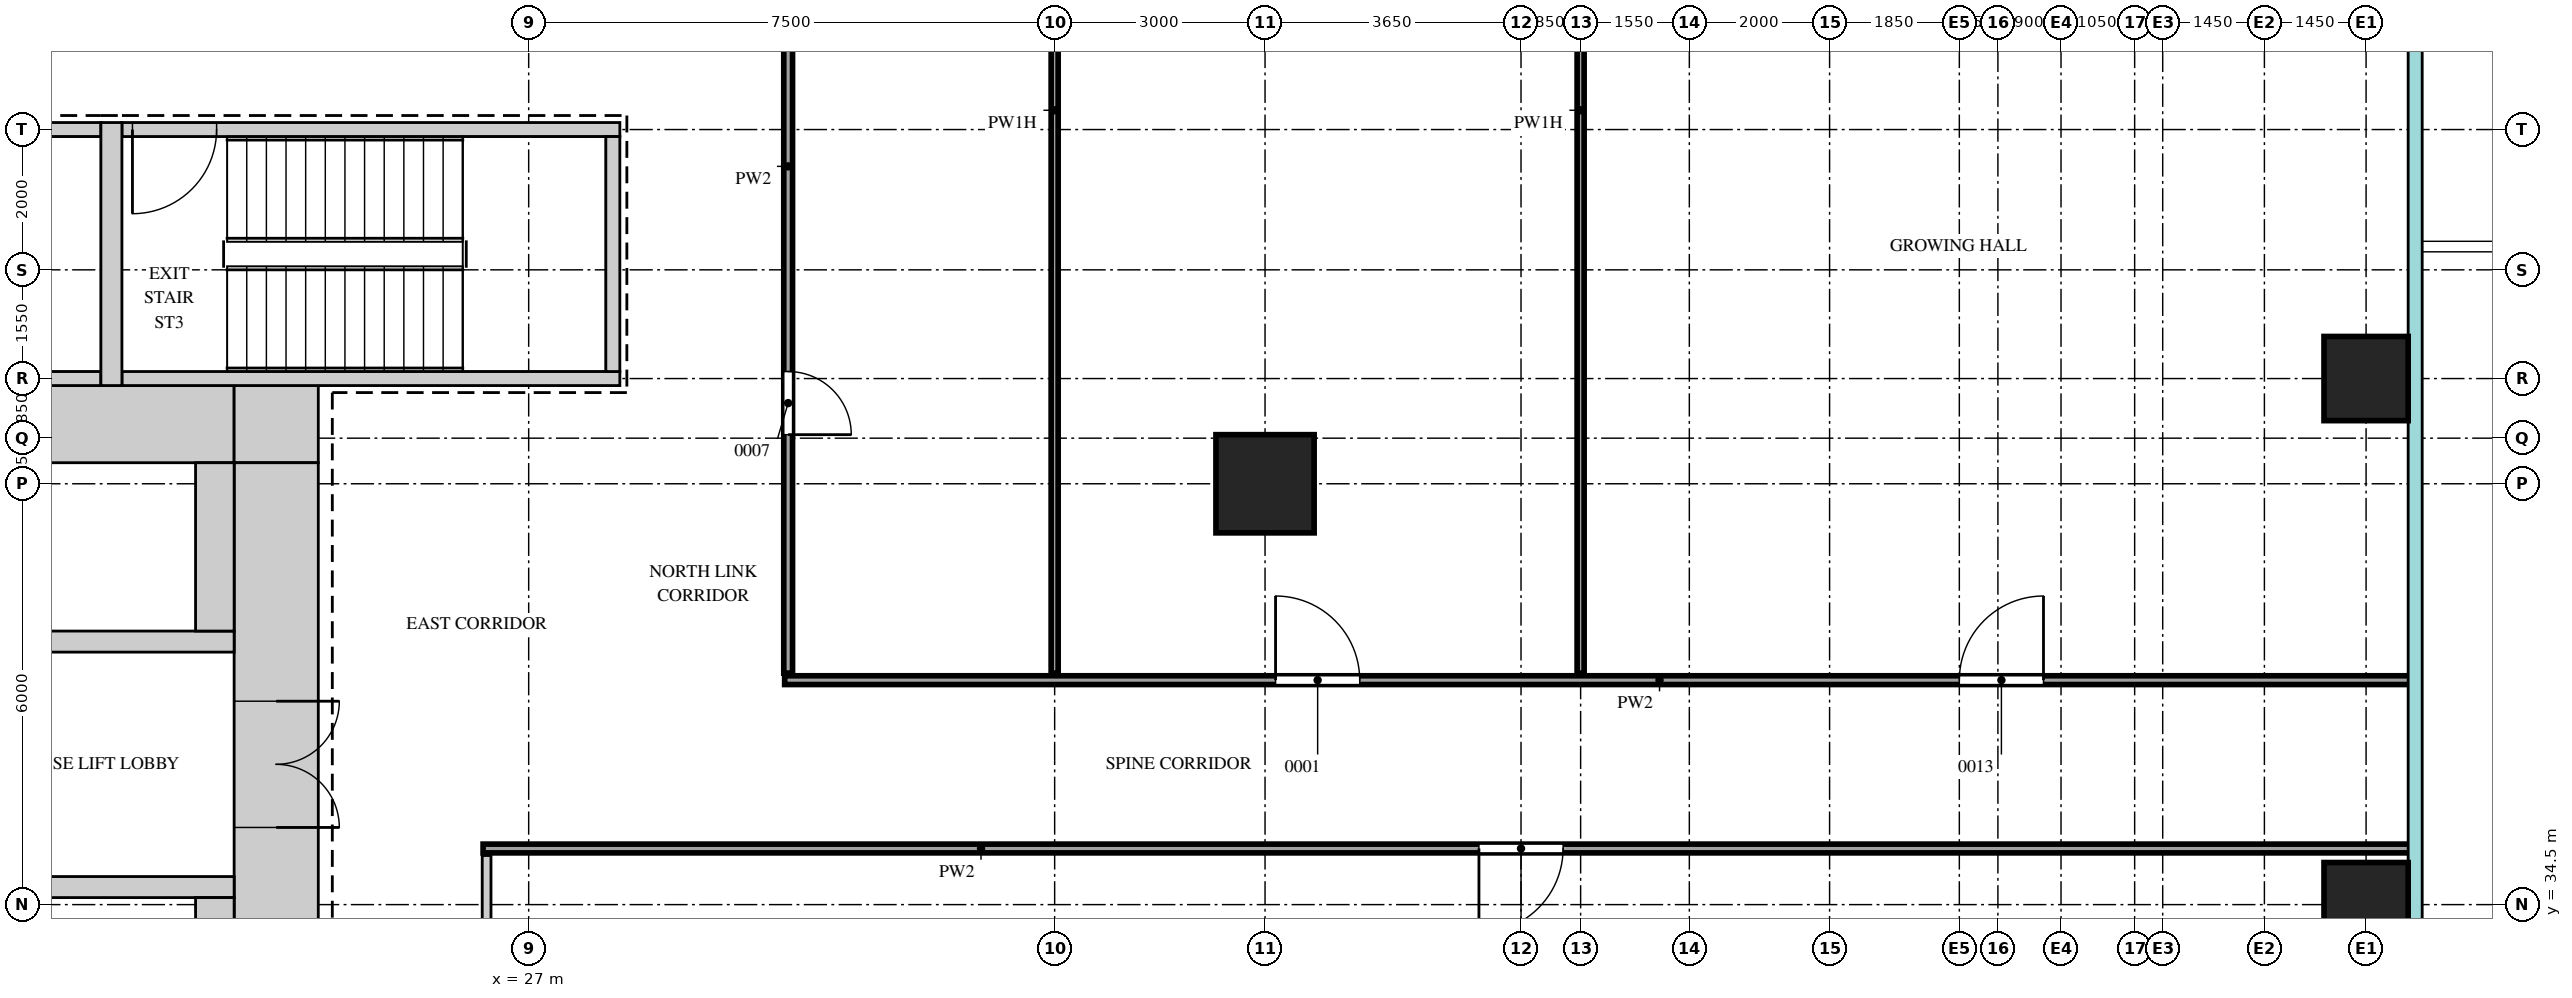
"""IFC4 building model, lengths in metres.
Left out: names, types, materials, properties, quantities, classifications, styles, units other than length and angle.
Written with IfcOpenShell. Run it as: python <this file> out.ifc"""

import sys

from ifc_helpers import new_model, si_unit, direction, frame, frame_2d, origin, origin_2d, place, context, subcontext, project, spatial, rectangle, extrude, source, transform, mapped, element, fill, save


model = new_model("IFC4")
c1 = context("Model", 3, precision=1e-05, world=origin(), true_north=direction((0.0, 1.0)))
c2 = subcontext(c1, "Body", "Model", "MODEL_VIEW")
j1 = project(units=[si_unit("LENGTHUNIT", "METRE"), si_unit("PLANEANGLEUNIT", "RADIAN")], contexts=[c1])
p1 = place(None, origin())
s1 = spatial("IfcSite", under=j1, at=p1, CompositionType="ELEMENT")
p2 = place(p1, origin())
s2 = spatial("IfcBuilding", under=s1, at=p2, CompositionType="ELEMENT")
p3 = place(p2, frame((0.0, 0.0, 51.0)))
s3 = spatial("IfcBuildingStorey", under=s2, at=p3, CompositionType="ELEMENT", Elevation=51.0)
m1 = source(origin(), c2, "Body", "SweptSolid", [
    extrude(rectangle(XDim=8.9, YDim=1.1, at=frame_2d((4.45, 0.0))), origin(), (0.0, 0.0, 1.0), 4.2),
])
p4 = place(p3, frame((13.9, 41.35, 0.0), z_axis=(0.0, 0.0, 1.0), x_axis=(1.0, 0.0, 0.0)))
e1 = element("IfcWall", 1, at=p4, inside=s3, PredefinedType="SHEAR", context=c2, shape_type="MappedRepresentation", body=[
    mapped(m1, transform((0.0, 0.0, 0.0))),
])
m2 = source(origin(), c2, "Body", "SweptSolid", [
    extrude(rectangle(XDim=1.2, YDim=1.1, at=frame_2d((0.6, 0.0))), origin(), (0.0, 0.0, 1.0), 4.2),
])
p5 = place(p3, frame((22.8, 41.35, 0.0), z_axis=(0.0, 0.0, 1.0), x_axis=(1.0, 0.0, 0.0)))
e2 = element("IfcWall", 2, at=p5, inside=s3, PredefinedType="SHEAR", context=c2, shape_type="MappedRepresentation", body=[
    mapped(m2, transform((0.0, 0.0, 0.0))),
])
m3 = source(origin(), c2, "Body", "SweptSolid", [
    extrude(rectangle(XDim=27.6, YDim=1.2, at=frame_2d((13.8, 0.0))), origin(), (0.0, 0.0, 1.0), 4.2),
])
p6 = place(p3, frame((23.4, 13.2, 0.0), z_axis=(0.0, 0.0, 1.0), x_axis=(0.0, 1.0, 0.0)))
e3 = element("IfcWall", 3, at=p6, inside=s3, PredefinedType="SHEAR", context=c2, shape_type="MappedRepresentation", body=[
    mapped(m3, transform((0.0, 0.0, 0.0))),
])
m4 = source(origin(), c2, "Body", "SweptSolid", [
    extrude(rectangle(XDim=1.8, YDim=2.1, at=frame_2d((0.9, 1.05))), frame((0.0, 0.61, 0.0), z_axis=(0.0, -1.0, 0.0), x_axis=(1.0, 0.0, 0.0)), (0.0, 0.0, 1.0), 1.22),
])
p7 = place(p6, frame((22.4, 0.0, 0.0)))
e4 = element("IfcOpeningElement", 4, at=p7, cuts=e3, PredefinedType="OPENING", context=c2, shape_type="MappedRepresentation", body=[
    mapped(m4, transform((0.0, 0.0, 0.0))),
])
m5 = source(origin(), c2, "Body", "SweptSolid", [
    extrude(rectangle(XDim=1.2, YDim=2.1, at=frame_2d((0.6, 1.05))), frame((0.0, 0.61, 0.0), z_axis=(0.0, -1.0, 0.0), x_axis=(1.0, 0.0, 0.0)), (0.0, 0.0, 1.0), 1.22),
])
p8 = place(p6, frame((15.15, 0.0, 0.0)))
e5 = element("IfcOpeningElement", 5, at=p8, cuts=e3, PredefinedType="OPENING", context=c2, shape_type="MappedRepresentation", body=[
    mapped(m5, transform((0.0, 0.0, 0.0))),
])
m6 = source(origin(), c2, "Body", "SweptSolid", [
    extrude(rectangle(XDim=0.9, YDim=2.1, at=frame_2d((0.45, 1.05))), frame((0.0, 0.61, 0.0), z_axis=(0.0, -1.0, 0.0), x_axis=(1.0, 0.0, 0.0)), (0.0, 0.0, 1.0), 1.22),
])
p9 = place(p6, frame((1.15, 0.0, 0.0)))
e6 = element("IfcOpeningElement", 6, at=p9, cuts=e3, PredefinedType="OPENING", context=c2, shape_type="MappedRepresentation", body=[
    mapped(m6, transform((0.0, 0.0, 0.0))),
])
p10 = place(p6, frame((4.35, 0.0, 0.0)))
e7 = element("IfcOpeningElement", 7, at=p10, cuts=e3, PredefinedType="OPENING", context=c2, shape_type="MappedRepresentation", body=[
    mapped(m6, transform((0.0, 0.0, 0.0))),
])
p11 = place(p6, frame((7.6, 0.0, 0.0)))
e8 = element("IfcOpeningElement", 8, at=p11, cuts=e3, PredefinedType="OPENING", context=c2, shape_type="MappedRepresentation", body=[
    mapped(m6, transform((0.0, 0.0, 0.0))),
])
m7 = source(origin(), c2, "Body", "SweptSolid", [
    extrude(rectangle(XDim=7.0, YDim=0.2, at=frame_2d((3.5, 0.0))), origin(), (0.0, 0.0, 1.0), 4.2),
])
p12 = place(p3, frame((13.9, 45.55, 0.0), z_axis=(0.0, 0.0, 1.0), x_axis=(1.0, 0.0, 0.0)))
e9 = element("IfcWall", 9, at=p12, inside=s3, PredefinedType="SHEAR", context=c2, shape_type="MappedRepresentation", body=[
    mapped(m7, transform((0.0, 0.0, 0.0))),
])
m8 = source(origin(), c2, "Body", "SweptSolid", [
    extrude(rectangle(XDim=1.2, YDim=2.1, at=frame_2d((0.6, 1.05))), frame((0.0, 0.11, 0.0), z_axis=(0.0, -1.0, 0.0), x_axis=(1.0, 0.0, 0.0)), (0.0, 0.0, 1.0), 0.22),
])
p13 = place(p12, frame((0.35, 0.0, 0.0)))
e10 = element("IfcOpeningElement", 10, at=p13, cuts=e9, PredefinedType="OPENING", context=c2, shape_type="MappedRepresentation", body=[
    mapped(m8, transform((0.0, 0.0, 0.0))),
])
p14 = place(p3, frame((13.9, 42.0, 0.0), z_axis=(0.0, 0.0, 1.0), x_axis=(1.0, 0.0, 0.0)))
e11 = element("IfcWall", 11, at=p14, inside=s3, PredefinedType="SHEAR", context=c2, shape_type="MappedRepresentation", body=[
    mapped(m7, transform((0.0, 0.0, 0.0))),
])
m9 = source(origin(), c2, "Body", "SweptSolid", [
    extrude(rectangle(XDim=7.1, YDim=0.2, at=frame_2d((3.55, 0.0))), origin(), (0.0, 0.0, 1.0), 4.2),
])
p15 = place(p3, frame((21.2, 45.55, 0.0), z_axis=(0.0, 0.0, 1.0), x_axis=(1.0, 0.0, 0.0)))
e12 = element("IfcWall", 12, at=p15, inside=s3, PredefinedType="SHEAR", context=c2, shape_type="MappedRepresentation", body=[
    mapped(m9, transform((0.0, 0.0, 0.0))),
])
p16 = place(p15, frame((0.15, 0.0, 0.0)))
e13 = element("IfcOpeningElement", 13, at=p16, cuts=e12, PredefinedType="OPENING", context=c2, shape_type="MappedRepresentation", body=[
    mapped(m8, transform((0.0, 0.0, 0.0))),
])
p17 = place(p3, frame((21.2, 42.0, 0.0), z_axis=(0.0, 0.0, 1.0), x_axis=(1.0, 0.0, 0.0)))
e14 = element("IfcWall", 14, at=p17, inside=s3, PredefinedType="SHEAR", context=c2, shape_type="MappedRepresentation", body=[
    mapped(m9, transform((0.0, 0.0, 0.0))),
])
m10 = source(origin(), c2, "Body", "SweptSolid", [
    extrude(rectangle(XDim=3.75, YDim=0.3, at=frame_2d((1.875, 0.0))), origin(), (0.0, 0.0, 1.0), 4.2),
])
p18 = place(p3, frame((21.05, 41.9, 0.0), z_axis=(0.0, 0.0, 1.0), x_axis=(0.0, 1.0, 0.0)))
e15 = element("IfcWall", 15, at=p18, inside=s3, PredefinedType="SHEAR", context=c2, shape_type="MappedRepresentation", body=[
    mapped(m10, transform((0.0, 0.0, 0.0))),
])
m11 = source(origin(), c2, "Body", "SweptSolid", [
    extrude(rectangle(XDim=3.35, YDim=0.2, at=frame_2d((1.675, 0.0))), origin(), (0.0, 0.0, 1.0), 4.2),
])
p19 = place(p3, frame((28.2, 42.1, 0.0), z_axis=(0.0, 0.0, 1.0), x_axis=(0.0, 1.0, 0.0)))
e16 = element("IfcWall", 16, at=p19, inside=s3, PredefinedType="SHEAR", context=c2, shape_type="MappedRepresentation", body=[
    mapped(m11, transform((0.0, 0.0, 0.0))),
])
m12 = source(origin(), c2, "Body", "SweptSolid", [
    extrude(rectangle(XDim=15.6, YDim=0.3, at=frame_2d((7.8, 0.0))), origin(), (0.0, 0.0, 1.0), 4.2),
])
p20 = place(p3, frame((7.2, 38.25, 0.0), z_axis=(0.0, 0.0, 1.0), x_axis=(1.0, 0.0, 0.0)))
e17 = element("IfcWall", 17, at=p20, inside=s3, PredefinedType="STANDARD", context=c2, shape_type="MappedRepresentation", body=[
    mapped(m12, transform((0.0, 0.0, 0.0))),
])
m13 = source(origin(), c2, "Body", "SweptSolid", [
    extrude(rectangle(XDim=1.2, YDim=2.1, at=frame_2d((0.6, 1.05))), frame((0.0, 0.16, 0.0), z_axis=(0.0, -1.0, 0.0), x_axis=(1.0, 0.0, 0.0)), (0.0, 0.0, 1.0), 0.32),
])
p21 = place(p20, frame((0.55, 0.0, 0.0)))
e18 = element("IfcOpeningElement", 18, at=p21, cuts=e17, PredefinedType="OPENING", context=c2, shape_type="MappedRepresentation", body=[
    mapped(m13, transform((0.0, 0.0, 0.0))),
])
p22 = place(p20, frame((3.1, 0.0, 0.0)))
e19 = element("IfcOpeningElement", 19, at=p22, cuts=e17, PredefinedType="OPENING", context=c2, shape_type="MappedRepresentation", body=[
    mapped(m13, transform((0.0, 0.0, 0.0))),
])
p23 = place(p20, frame((5.65, 0.0, 0.0)))
e20 = element("IfcOpeningElement", 20, at=p23, cuts=e17, PredefinedType="OPENING", context=c2, shape_type="MappedRepresentation", body=[
    mapped(m13, transform((0.0, 0.0, 0.0))),
])
p24 = place(p20, frame((8.2, 0.0, 0.0)))
e21 = element("IfcOpeningElement", 21, at=p24, cuts=e17, PredefinedType="OPENING", context=c2, shape_type="MappedRepresentation", body=[
    mapped(m13, transform((0.0, 0.0, 0.0))),
])
p25 = place(p3, frame((7.2, 34.75, 0.0), z_axis=(0.0, 0.0, 1.0), x_axis=(1.0, 0.0, 0.0)))
e22 = element("IfcWall", 22, at=p25, inside=s3, PredefinedType="STANDARD", context=c2, shape_type="MappedRepresentation", body=[
    mapped(m12, transform((0.0, 0.0, 0.0))),
])
p26 = place(p25, frame((0.55, 0.0, 0.0)))
e23 = element("IfcOpeningElement", 23, at=p26, cuts=e22, PredefinedType="OPENING", context=c2, shape_type="MappedRepresentation", body=[
    mapped(m13, transform((0.0, 0.0, 0.0))),
])
p27 = place(p25, frame((3.1, 0.0, 0.0)))
e24 = element("IfcOpeningElement", 24, at=p27, cuts=e22, PredefinedType="OPENING", context=c2, shape_type="MappedRepresentation", body=[
    mapped(m13, transform((0.0, 0.0, 0.0))),
])
p28 = place(p25, frame((5.65, 0.0, 0.0)))
e25 = element("IfcOpeningElement", 25, at=p28, cuts=e22, PredefinedType="OPENING", context=c2, shape_type="MappedRepresentation", body=[
    mapped(m13, transform((0.0, 0.0, 0.0))),
])
p29 = place(p25, frame((8.2, 0.0, 0.0)))
e26 = element("IfcOpeningElement", 26, at=p29, cuts=e22, PredefinedType="OPENING", context=c2, shape_type="MappedRepresentation", body=[
    mapped(m13, transform((0.0, 0.0, 0.0))),
])
m14 = source(origin(), c2, "Body", "SweptSolid", [
    extrude(rectangle(XDim=2.4, YDim=0.55, at=frame_2d((1.2, 0.0))), origin(), (0.0, 0.0, 1.0), 4.2),
])
for number, where, z_axis, x_axis in (
    (27, (22.525, 38.4, 0.0), (0.0, 0.0, 1.0), (0.0, 1.0, 0.0)),
    (28, (22.525, 32.2, 0.0), (0.0, 0.0, 1.0), (0.0, 1.0, 0.0)),
):
    element("IfcWall", number, at=place(p3, frame(where, z_axis=z_axis, x_axis=x_axis)), inside=s3, PredefinedType="STANDARD", context=c2, shape_type="MappedRepresentation", body=[
        mapped(m14, transform((0.0, 0.0, 0.0))),
    ])
m15 = source(origin(), c2, "Body", "SweptSolid", [
    extrude(rectangle(XDim=1.2, YDim=1.2, at=origin_2d()), origin(), (0.0, 0.0, 1.0), 4.2),
])
for number, where, z_axis, x_axis in (
    (29, (53.2, 34.5, 0.0), (0.0, 0.0, 1.0), (1.0, 0.0, 0.0)),
    (30, (53.2, 42.0, 0.0), (0.0, 0.0, 1.0), (1.0, 0.0, 0.0)),
):
    element("IfcColumn", number, at=place(p3, frame(where, z_axis=z_axis, x_axis=x_axis)), inside=s3, PredefinedType="COLUMN", context=c2, shape_type="MappedRepresentation", body=[
        mapped(m15, transform((0.0, 0.0, 0.0))),
    ])
m16 = source(origin(), c2, "Body", "SweptSolid", [
    extrude(rectangle(XDim=1.4, YDim=1.4, at=origin_2d()), origin(), (0.0, 0.0, 1.0), 4.2),
])
p30 = place(p3, frame((37.5, 40.5, 0.0), z_axis=(0.0, 0.0, 1.0), x_axis=(1.0, 0.0, 0.0)))
e31 = element("IfcColumn", 31, at=p30, inside=s3, PredefinedType="COLUMN", context=c2, shape_type="MappedRepresentation", body=[
    mapped(m16, transform((0.0, 0.0, 0.0))),
])
m17 = source(origin(), c2, "Body", "SweptSolid", [
    extrude(rectangle(XDim=27.1, YDim=0.125, at=frame_2d((13.55, 0.0))), origin(), (0.0, 0.0, 1.0), 4.3),
])
p31 = place(p3, frame((26.4, 8.1, 0.0), z_axis=(0.0, 0.0, 1.0), x_axis=(0.0, 1.0, 0.0)))
e32 = element("IfcWall", 32, at=p31, inside=s3, PredefinedType="PARTITIONING", context=c2, shape_type="MappedRepresentation", body=[
    mapped(m17, transform((0.0, 0.0, 0.0))),
])
m18 = source(origin(), c2, "Body", "SweptSolid", [
    extrude(rectangle(XDim=1.2, YDim=2.1, at=frame_2d((0.6, 1.05))), frame((0.0, 0.073, 0.0), z_axis=(0.0, -1.0, 0.0), x_axis=(1.0, 0.0, 0.0)), (0.0, 0.0, 1.0), 0.145),
])
p32 = place(p31, frame((3.3, 0.0, 0.0)))
e33 = element("IfcOpeningElement", 33, at=p32, cuts=e32, PredefinedType="OPENING", context=c2, shape_type="MappedRepresentation", body=[
    mapped(m18, transform((0.0, 0.0, 0.0))),
])
p33 = place(p31, frame((11.3, 0.0, 0.0)))
e34 = element("IfcOpeningElement", 34, at=p33, cuts=e32, PredefinedType="OPENING", context=c2, shape_type="MappedRepresentation", body=[
    mapped(m18, transform((0.0, 0.0, 0.0))),
])
m19 = source(origin(), c2, "Body", "SweptSolid", [
    extrude(rectangle(XDim=27.5, YDim=0.125, at=frame_2d((13.75, 0.0))), origin(), (0.0, 0.0, 1.0), 4.3),
])
p34 = place(p3, frame((26.35, 35.3, 0.0), z_axis=(0.0, 0.0, 1.0), x_axis=(1.0, 0.0, 0.0)))
e35 = element("IfcWall", 35, at=p34, inside=s3, PredefinedType="PARTITIONING", context=c2, shape_type="MappedRepresentation", body=[
    mapped(m19, transform((0.0, 0.0, 0.0))),
])
p35 = place(p34, frame((14.2, 0.0, 0.0)))
e36 = element("IfcOpeningElement", 36, at=p35, cuts=e35, PredefinedType="OPENING", context=c2, shape_type="MappedRepresentation", body=[
    mapped(m18, transform((0.0, 0.0, 0.0))),
])
m20 = source(origin(), c2, "Body", "SweptSolid", [
    extrude(rectangle(XDim=23.2, YDim=0.125, at=frame_2d((11.6, 0.0))), origin(), (0.0, 0.0, 1.0), 4.3),
])
p36 = place(p3, frame((30.65, 37.7, 0.0), z_axis=(0.0, 0.0, 1.0), x_axis=(1.0, 0.0, 0.0)))
e37 = element("IfcWall", 37, at=p36, inside=s3, PredefinedType="PARTITIONING", context=c2, shape_type="MappedRepresentation", body=[
    mapped(m20, transform((0.0, 0.0, 0.0))),
])
p37 = place(p36, frame((7.0, 0.0, 0.0)))
e38 = element("IfcOpeningElement", 38, at=p37, cuts=e37, PredefinedType="OPENING", context=c2, shape_type="MappedRepresentation", body=[
    mapped(m18, transform((0.0, 0.0, 0.0))),
])
p38 = place(p36, frame((16.75, 0.0, 0.0)))
e39 = element("IfcOpeningElement", 39, at=p38, cuts=e37, PredefinedType="OPENING", context=c2, shape_type="MappedRepresentation", body=[
    mapped(m18, transform((0.0, 0.0, 0.0))),
])
m21 = source(origin(), c2, "Body", "SweptSolid", [
    extrude(rectangle(XDim=10.15, YDim=0.125, at=frame_2d((5.075, 0.0))), origin(), (0.0, 0.0, 1.0), 4.3),
])
p39 = place(p3, frame((30.7, 37.8, 0.0), z_axis=(0.0, 0.0, 1.0), x_axis=(0.0, 1.0, 0.0)))
e40 = element("IfcWall", 40, at=p39, inside=s3, PredefinedType="PARTITIONING", context=c2, shape_type="MappedRepresentation", body=[
    mapped(m21, transform((0.0, 0.0, 0.0))),
])
m22 = source(origin(), c2, "Body", "SweptSolid", [
    extrude(rectangle(XDim=0.9, YDim=2.1, at=frame_2d((0.45, 1.05))), frame((0.0, 0.073, 0.0), z_axis=(0.0, -1.0, 0.0), x_axis=(1.0, 0.0, 0.0)), (0.0, 0.0, 1.0), 0.145),
])
p40 = place(p39, frame((3.4, 0.0, 0.0)))
e41 = element("IfcOpeningElement", 41, at=p40, cuts=e40, PredefinedType="OPENING", context=c2, shape_type="MappedRepresentation", body=[
    mapped(m22, transform((0.0, 0.0, 0.0))),
])
m23 = source(origin(), c2, "Body", "SweptSolid", [
    extrude(rectangle(XDim=16.05, YDim=0.1, at=frame_2d((8.025, 0.0))), origin(), (0.0, 0.0, 1.0), 3.7),
])
for number, where, z_axis, x_axis in (
    (42, (34.5, 37.8, 0.0), (0.0, 0.0, 1.0), (0.0, 1.0, 0.0)),
    (43, (42.0, 37.8, 0.0), (0.0, 0.0, 1.0), (0.0, 1.0, 0.0)),
):
    element("IfcWall", number, at=place(p3, frame(where, z_axis=z_axis, x_axis=x_axis)), inside=s3, PredefinedType="PARTITIONING", context=c2, shape_type="MappedRepresentation", body=[
        mapped(m23, transform((0.0, 0.0, 0.0))),
    ])
m24 = source(origin(), c2, "Body", "SweptSolid", [
    extrude(rectangle(XDim=1.8, YDim=2.1, at=frame_2d((0.9, 1.05))), frame((0.0, 0.55, 0.0), z_axis=(0.0, -1.0, 0.0), x_axis=(1.0, 0.0, 0.0)), (0.0, 0.0, 1.0), 1.1),
])
p41 = place(p7, origin())
e44 = element("IfcDoor", 44, at=p41, inside=s3, OperationType="DOUBLE_DOOR_SINGLE_SWING", PredefinedType="DOOR", context=c2, shape_type="MappedRepresentation", body=[
    mapped(m24, transform((0.0, 0.0, 0.0))),
])
fill(e4, e44)
m25 = source(origin(), c2, "Body", "SweptSolid", [
    extrude(rectangle(XDim=1.2, YDim=2.1, at=frame_2d((0.6, 1.05))), frame((0.0, 0.025, 0.0), z_axis=(0.0, -1.0, 0.0), x_axis=(1.0, 0.0, 0.0)), (0.0, 0.0, 1.0), 0.05),
])
p42 = place(p35, origin())
e45 = element("IfcDoor", 45, at=p42, inside=s3, OperationType="SINGLE_SWING_LEFT", PredefinedType="DOOR", context=c2, shape_type="MappedRepresentation", body=[
    mapped(m25, transform((0.0, 0.0, 0.0))),
])
fill(e36, e45)
m26 = source(origin(), c2, "Body", "SweptSolid", [
    extrude(rectangle(XDim=0.9, YDim=2.1, at=frame_2d((0.45, 1.05))), frame((0.0, 0.025, 0.0), z_axis=(0.0, -1.0, 0.0), x_axis=(1.0, 0.0, 0.0)), (0.0, 0.0, 1.0), 0.05),
])
p43 = place(p40, origin())
e46 = element("IfcDoor", 46, at=p43, inside=s3, OperationType="SINGLE_SWING_LEFT", PredefinedType="DOOR", context=c2, shape_type="MappedRepresentation", body=[
    mapped(m26, transform((0.0, 0.0, 0.0))),
])
fill(e41, e46)
p44 = place(p37, origin())
e47 = element("IfcDoor", 47, at=p44, inside=s3, OperationType="SINGLE_SWING_RIGHT", PredefinedType="DOOR", context=c2, shape_type="MappedRepresentation", body=[
    mapped(m25, transform((0.0, 0.0, 0.0))),
])
fill(e38, e47)
p45 = place(p38, origin())
e48 = element("IfcDoor", 48, at=p45, inside=s3, OperationType="SINGLE_SWING_LEFT", PredefinedType="DOOR", context=c2, shape_type="MappedRepresentation", body=[
    mapped(m25, transform((0.0, 0.0, 0.0))),
])
fill(e39, e48)
p46 = place(p16, origin())
e49 = element("IfcDoor", 49, at=p46, inside=s3, OperationType="SINGLE_SWING_LEFT", PredefinedType="DOOR", context=c2, shape_type="MappedRepresentation", body=[
    mapped(m25, transform((0.0, 0.0, 0.0))),
])
fill(e13, e49)
save(model, sys.argv[1])
